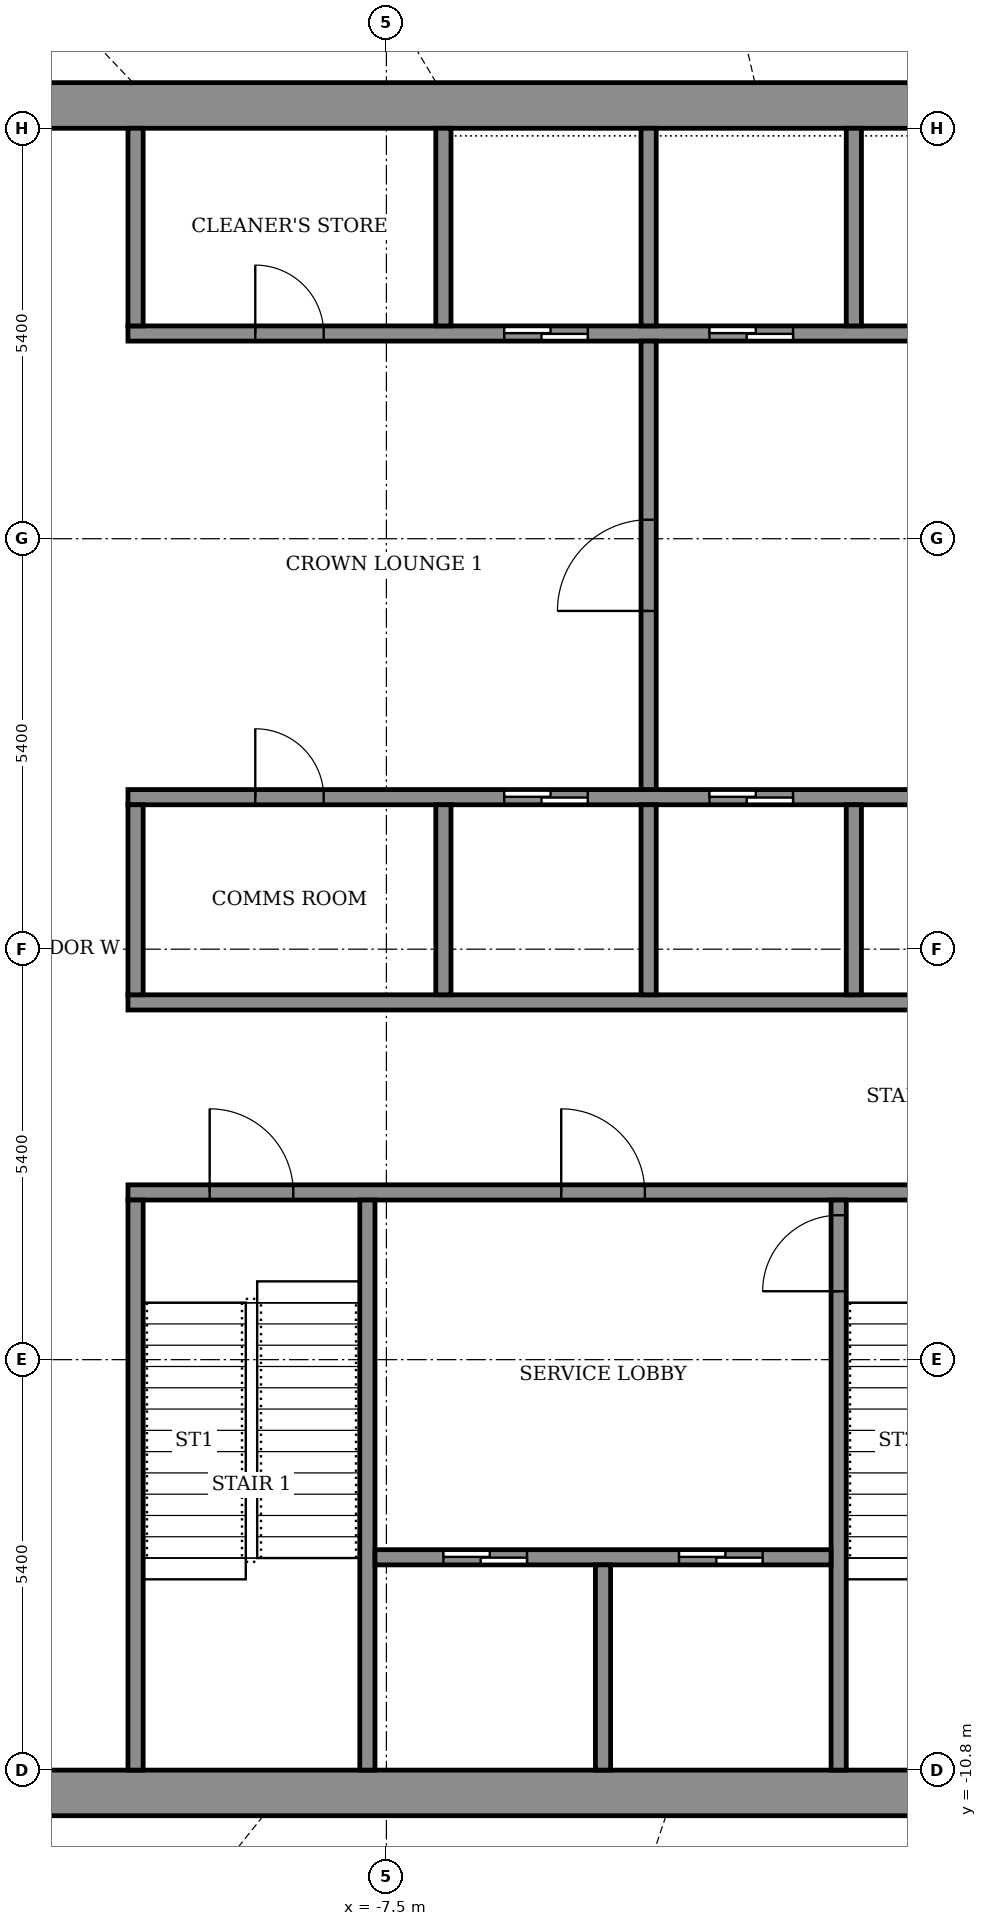
"""IFC4 building model, lengths in metres.
Left out: names, types, materials, properties, quantities, classifications, styles, units other than length and angle.
Written with IfcOpenShell. Run it as: python <this file> out.ifc"""

import sys

from ifc_helpers import new_model, si_unit, direction, frame, frame_2d, origin, place, context, subcontext, project, spatial, rectangle, extrude, element, fill, save


model = new_model("IFC4")
c1 = context("Model", 3, precision=1e-05, world=origin(), true_north=direction((0.0, 1.0)))
c2 = subcontext(c1, "Body", "Model", "MODEL_VIEW")
j1 = project(units=[si_unit("LENGTHUNIT", "METRE"), si_unit("PLANEANGLEUNIT", "RADIAN")], contexts=[c1])
p1 = place(None, origin())
s1 = spatial("IfcSite", under=j1, at=p1, CompositionType="ELEMENT")
p2 = place(p1, origin())
s2 = spatial("IfcBuilding", under=s1, at=p2, CompositionType="ELEMENT")
p3 = place(p2, frame((0.0, 0.0, 346.1)))
s3 = spatial("IfcBuildingStorey", under=s2, at=p3, CompositionType="ELEMENT", Elevation=346.1)
for number, where, z_axis, x_axis in (
    (1, (-14.4, -11.1, 0.0), (0.0, 0.0, 1.0), (1.0, 0.0, 0.0)),
    (2, (-14.4, 11.1, 0.0), (0.0, 0.0, 1.0), (1.0, 0.0, 0.0)),
):
    element("IfcWall", number, at=place(p3, frame(where, z_axis=z_axis, x_axis=x_axis)), inside=s3, PredefinedType="SHEAR", context=c2, shape_type="SweptSolid", body=[
        extrude(rectangle(XDim=28.8, YDim=0.6, at=frame_2d((14.4, 0.0))), origin(), (0.0, 0.0, 1.0), 4.6),
    ])
p4 = place(p3, frame((-10.9, -3.2, 0.0), z_axis=(0.0, 0.0, 1.0), x_axis=(1.0, 0.0, 0.0)))
e3 = element("IfcWall", 3, at=p4, inside=s3, PredefinedType="SHEAR", context=c2, shape_type="SweptSolid", body=[
    extrude(rectangle(XDim=21.8, YDim=0.2, at=frame_2d((10.9, 0.0))), origin(), (0.0, 0.0, 1.0), 4.05),
])
p5 = place(p4, frame((1.075, 0.0, 0.0)))
e4 = element("IfcOpeningElement", 4, at=p5, cuts=e3, PredefinedType="OPENING", context=c2, shape_type="SweptSolid", body=[
    extrude(rectangle(XDim=1.1, YDim=2.1, at=frame_2d((0.55, 1.05))), frame((0.0, 0.11, 0.0), z_axis=(0.0, -1.0, 0.0), x_axis=(1.0, 0.0, 0.0)), (0.0, 0.0, 1.0), 0.22),
])
p6 = place(p4, frame((10.325, 0.0, 0.0)))
e5 = element("IfcOpeningElement", 5, at=p6, cuts=e3, PredefinedType="OPENING", context=c2, shape_type="SweptSolid", body=[
    extrude(rectangle(XDim=1.1, YDim=2.1, at=frame_2d((0.55, 1.05))), frame((0.0, 0.11, 0.0), z_axis=(0.0, -1.0, 0.0), x_axis=(1.0, 0.0, 0.0)), (0.0, 0.0, 1.0), 0.22),
])
p7 = place(p4, frame((19.625, 0.0, 0.0)))
e6 = element("IfcOpeningElement", 6, at=p7, cuts=e3, PredefinedType="OPENING", context=c2, shape_type="SweptSolid", body=[
    extrude(rectangle(XDim=1.1, YDim=2.1, at=frame_2d((0.55, 1.05))), frame((0.0, 0.11, 0.0), z_axis=(0.0, -1.0, 0.0), x_axis=(1.0, 0.0, 0.0)), (0.0, 0.0, 1.0), 0.22),
])
p8 = place(p4, frame((5.7, 0.0, 0.0)))
e7 = element("IfcOpeningElement", 7, at=p8, cuts=e3, PredefinedType="OPENING", context=c2, shape_type="SweptSolid", body=[
    extrude(rectangle(XDim=1.1, YDim=2.1, at=frame_2d((0.55, 1.05))), frame((0.0, 0.11, 0.0), z_axis=(0.0, -1.0, 0.0), x_axis=(1.0, 0.0, 0.0)), (0.0, 0.0, 1.0), 0.22),
])
p9 = place(p4, frame((14.975, 0.0, 0.0)))
e8 = element("IfcOpeningElement", 8, at=p9, cuts=e3, PredefinedType="OPENING", context=c2, shape_type="SweptSolid", body=[
    extrude(rectangle(XDim=1.1, YDim=2.1, at=frame_2d((0.55, 1.05))), frame((0.0, 0.11, 0.0), z_axis=(0.0, -1.0, 0.0), x_axis=(1.0, 0.0, 0.0)), (0.0, 0.0, 1.0), 0.22),
])
p10 = place(p3, frame((-10.9, -0.7, 0.0), z_axis=(0.0, 0.0, 1.0), x_axis=(1.0, 0.0, 0.0)))
e9 = element("IfcWall", 9, at=p10, inside=s3, PredefinedType="SHEAR", context=c2, shape_type="SweptSolid", body=[
    extrude(rectangle(XDim=21.8, YDim=0.2, at=frame_2d((10.9, 0.0))), origin(), (0.0, 0.0, 1.0), 4.05),
])
p11 = place(p3, frame((-10.9, 2.0, 0.0), z_axis=(0.0, 0.0, 1.0), x_axis=(1.0, 0.0, 0.0)))
e10 = element("IfcWall", 10, at=p11, inside=s3, PredefinedType="SHEAR", context=c2, shape_type="SweptSolid", body=[
    extrude(rectangle(XDim=21.8, YDim=0.2, at=frame_2d((10.9, 0.0))), origin(), (0.0, 0.0, 1.0), 4.05),
])
p12 = place(p11, frame((4.95, 0.0, 0.0)))
e11 = element("IfcOpeningElement", 11, at=p12, cuts=e10, PredefinedType="OPENING", context=c2, shape_type="SweptSolid", body=[
    extrude(rectangle(XDim=1.1, YDim=2.1, at=frame_2d((0.55, 1.05))), frame((0.0, 0.11, 0.0), z_axis=(0.0, -1.0, 0.0), x_axis=(1.0, 0.0, 0.0)), (0.0, 0.0, 1.0), 0.22),
])
p13 = place(p11, frame((7.65, 0.0, 0.0)))
e12 = element("IfcOpeningElement", 12, at=p13, cuts=e10, PredefinedType="OPENING", context=c2, shape_type="SweptSolid", body=[
    extrude(rectangle(XDim=1.1, YDim=2.1, at=frame_2d((0.55, 1.05))), frame((0.0, 0.11, 0.0), z_axis=(0.0, -1.0, 0.0), x_axis=(1.0, 0.0, 0.0)), (0.0, 0.0, 1.0), 0.22),
])
p14 = place(p11, frame((10.35, 0.0, 0.0)))
e13 = element("IfcOpeningElement", 13, at=p14, cuts=e10, PredefinedType="OPENING", context=c2, shape_type="SweptSolid", body=[
    extrude(rectangle(XDim=1.1, YDim=2.1, at=frame_2d((0.55, 1.05))), frame((0.0, 0.11, 0.0), z_axis=(0.0, -1.0, 0.0), x_axis=(1.0, 0.0, 0.0)), (0.0, 0.0, 1.0), 0.22),
])
p15 = place(p11, frame((1.675, 0.0, 0.0)))
e14 = element("IfcOpeningElement", 14, at=p15, cuts=e10, PredefinedType="OPENING", context=c2, shape_type="SweptSolid", body=[
    extrude(rectangle(XDim=0.9, YDim=2.1, at=frame_2d((0.45, 1.05))), frame((0.0, 0.11, 0.0), z_axis=(0.0, -1.0, 0.0), x_axis=(1.0, 0.0, 0.0)), (0.0, 0.0, 1.0), 0.22),
])
p16 = place(p11, frame((13.825, 0.0, 0.0)))
e15 = element("IfcOpeningElement", 15, at=p16, cuts=e10, PredefinedType="OPENING", context=c2, shape_type="SweptSolid", body=[
    extrude(rectangle(XDim=0.9, YDim=2.1, at=frame_2d((0.45, 1.05))), frame((0.0, 0.11, 0.0), z_axis=(0.0, -1.0, 0.0), x_axis=(1.0, 0.0, 0.0)), (0.0, 0.0, 1.0), 0.22),
])
p17 = place(p11, frame((18.55, 0.0, 0.0)))
e16 = element("IfcOpeningElement", 16, at=p17, cuts=e10, PredefinedType="OPENING", context=c2, shape_type="SweptSolid", body=[
    extrude(rectangle(XDim=0.9, YDim=2.1, at=frame_2d((0.45, 1.05))), frame((0.0, 0.11, 0.0), z_axis=(0.0, -1.0, 0.0), x_axis=(1.0, 0.0, 0.0)), (0.0, 0.0, 1.0), 0.22),
])
p18 = place(p3, frame((-10.9, 8.1, 0.0), z_axis=(0.0, 0.0, 1.0), x_axis=(1.0, 0.0, 0.0)))
e17 = element("IfcWall", 17, at=p18, inside=s3, PredefinedType="SHEAR", context=c2, shape_type="SweptSolid", body=[
    extrude(rectangle(XDim=21.8, YDim=0.2, at=frame_2d((10.9, 0.0))), origin(), (0.0, 0.0, 1.0), 4.05),
])
p19 = place(p18, frame((4.95, 0.0, 0.0)))
e18 = element("IfcOpeningElement", 18, at=p19, cuts=e17, PredefinedType="OPENING", context=c2, shape_type="SweptSolid", body=[
    extrude(rectangle(XDim=1.1, YDim=2.1, at=frame_2d((0.55, 1.05))), frame((0.0, 0.11, 0.0), z_axis=(0.0, -1.0, 0.0), x_axis=(1.0, 0.0, 0.0)), (0.0, 0.0, 1.0), 0.22),
])
p20 = place(p18, frame((7.65, 0.0, 0.0)))
e19 = element("IfcOpeningElement", 19, at=p20, cuts=e17, PredefinedType="OPENING", context=c2, shape_type="SweptSolid", body=[
    extrude(rectangle(XDim=1.1, YDim=2.1, at=frame_2d((0.55, 1.05))), frame((0.0, 0.11, 0.0), z_axis=(0.0, -1.0, 0.0), x_axis=(1.0, 0.0, 0.0)), (0.0, 0.0, 1.0), 0.22),
])
p21 = place(p18, frame((10.35, 0.0, 0.0)))
e20 = element("IfcOpeningElement", 20, at=p21, cuts=e17, PredefinedType="OPENING", context=c2, shape_type="SweptSolid", body=[
    extrude(rectangle(XDim=1.1, YDim=2.1, at=frame_2d((0.55, 1.05))), frame((0.0, 0.11, 0.0), z_axis=(0.0, -1.0, 0.0), x_axis=(1.0, 0.0, 0.0)), (0.0, 0.0, 1.0), 0.22),
])
p22 = place(p18, frame((1.675, 0.0, 0.0)))
e21 = element("IfcOpeningElement", 21, at=p22, cuts=e17, PredefinedType="OPENING", context=c2, shape_type="SweptSolid", body=[
    extrude(rectangle(XDim=0.9, YDim=2.1, at=frame_2d((0.45, 1.05))), frame((0.0, 0.11, 0.0), z_axis=(0.0, -1.0, 0.0), x_axis=(1.0, 0.0, 0.0)), (0.0, 0.0, 1.0), 0.22),
])
p23 = place(p18, frame((13.825, 0.0, 0.0)))
e22 = element("IfcOpeningElement", 22, at=p23, cuts=e17, PredefinedType="OPENING", context=c2, shape_type="SweptSolid", body=[
    extrude(rectangle(XDim=0.9, YDim=2.1, at=frame_2d((0.45, 1.05))), frame((0.0, 0.11, 0.0), z_axis=(0.0, -1.0, 0.0), x_axis=(1.0, 0.0, 0.0)), (0.0, 0.0, 1.0), 0.22),
])
p24 = place(p18, frame((18.55, 0.0, 0.0)))
e23 = element("IfcOpeningElement", 23, at=p24, cuts=e17, PredefinedType="OPENING", context=c2, shape_type="SweptSolid", body=[
    extrude(rectangle(XDim=0.9, YDim=2.1, at=frame_2d((0.45, 1.05))), frame((0.0, 0.11, 0.0), z_axis=(0.0, -1.0, 0.0), x_axis=(1.0, 0.0, 0.0)), (0.0, 0.0, 1.0), 0.22),
])
for number, where, z_axis, x_axis in (
    (24, (-10.8, -10.8, 0.0), (0.0, 0.0, 1.0), (0.0, 1.0, 0.0)),
    (25, (-7.75, -10.8, 0.0), (0.0, 0.0, 1.0), (0.0, 1.0, 0.0)),
):
    element("IfcWall", number, at=place(p3, frame(where, z_axis=z_axis, x_axis=x_axis)), inside=s3, PredefinedType="SHEAR", context=c2, shape_type="SweptSolid", body=[
        extrude(rectangle(XDim=7.5, YDim=0.2, at=frame_2d((3.75, 0.0))), origin(), (0.0, 0.0, 1.0), 4.05),
    ])
p25 = place(p3, frame((-1.55, -10.8, 0.0), z_axis=(0.0, 0.0, 1.0), x_axis=(0.0, 1.0, 0.0)))
e26 = element("IfcWall", 26, at=p25, inside=s3, PredefinedType="SHEAR", context=c2, shape_type="SweptSolid", body=[
    extrude(rectangle(XDim=7.5, YDim=0.2, at=frame_2d((3.75, 0.0))), origin(), (0.0, 0.0, 1.0), 4.05),
])
p26 = place(p25, frame((6.3, 0.0, 0.0)))
e27 = element("IfcOpeningElement", 27, at=p26, cuts=e26, PredefinedType="OPENING", context=c2, shape_type="SweptSolid", body=[
    extrude(rectangle(XDim=1.0, YDim=2.1, at=frame_2d((0.5, 1.05))), frame((0.0, 0.11, 0.0), z_axis=(0.0, -1.0, 0.0), x_axis=(1.0, 0.0, 0.0)), (0.0, 0.0, 1.0), 0.22),
])
p27 = place(p3, frame((-7.65, -8.0, 0.0), z_axis=(0.0, 0.0, 1.0), x_axis=(1.0, 0.0, 0.0)))
e28 = element("IfcWall", 28, at=p27, inside=s3, PredefinedType="SHEAR", context=c2, shape_type="SweptSolid", body=[
    extrude(rectangle(XDim=6.0, YDim=0.2, at=frame_2d((3.0, 0.0))), origin(), (0.0, 0.0, 1.0), 4.05),
])
p28 = place(p27, frame((0.9, 0.0, 0.0)))
e29 = element("IfcOpeningElement", 29, at=p28, cuts=e28, PredefinedType="OPENING", context=c2, shape_type="SweptSolid", body=[
    extrude(rectangle(XDim=1.1, YDim=2.1, at=frame_2d((0.55, 1.05))), frame((0.0, 0.11, 0.0), z_axis=(0.0, -1.0, 0.0), x_axis=(1.0, 0.0, 0.0)), (0.0, 0.0, 1.0), 0.22),
])
p29 = place(p27, frame((4.0, 0.0, 0.0)))
e30 = element("IfcOpeningElement", 30, at=p29, cuts=e28, PredefinedType="OPENING", context=c2, shape_type="SweptSolid", body=[
    extrude(rectangle(XDim=1.1, YDim=2.1, at=frame_2d((0.55, 1.05))), frame((0.0, 0.11, 0.0), z_axis=(0.0, -1.0, 0.0), x_axis=(1.0, 0.0, 0.0)), (0.0, 0.0, 1.0), 0.22),
])
p30 = place(p3, frame((-4.65, -10.8, 0.0), z_axis=(0.0, 0.0, 1.0), x_axis=(0.0, 1.0, 0.0)))
e31 = element("IfcWall", 31, at=p30, inside=s3, PredefinedType="SHEAR", context=c2, shape_type="SweptSolid", body=[
    extrude(rectangle(XDim=2.7, YDim=0.2, at=frame_2d((1.35, 0.0))), origin(), (0.0, 0.0, 1.0), 4.05),
])
p31 = place(p3, frame((-10.8, -0.6, 0.0), z_axis=(0.0, 0.0, 1.0), x_axis=(0.0, 1.0, 0.0)))
e32 = element("IfcWall", 32, at=p31, inside=s3, PredefinedType="STANDARD", context=c2, shape_type="SweptSolid", body=[
    extrude(rectangle(XDim=2.5, YDim=0.2, at=frame_2d((1.25, 0.0))), origin(), (0.0, 0.0, 1.0), 4.05),
])
for number, where, z_axis, x_axis in (
    (33, (-6.75, -0.6, 0.0), (0.0, 0.0, 1.0), (0.0, 1.0, 0.0)),
    (34, (-4.05, -0.6, 0.0), (0.0, 0.0, 1.0), (0.0, 1.0, 0.0)),
    (35, (-1.35, -0.6, 0.0), (0.0, 0.0, 1.0), (0.0, 1.0, 0.0)),
):
    element("IfcWall", number, at=place(p3, frame(where, z_axis=z_axis, x_axis=x_axis)), inside=s3, PredefinedType="SHEAR", context=c2, shape_type="SweptSolid", body=[
        extrude(rectangle(XDim=2.5, YDim=0.2, at=frame_2d((1.25, 0.0))), origin(), (0.0, 0.0, 1.0), 4.05),
    ])
p32 = place(p3, frame((-10.8, 8.2, 0.0), z_axis=(0.0, 0.0, 1.0), x_axis=(0.0, 1.0, 0.0)))
e36 = element("IfcWall", 36, at=p32, inside=s3, PredefinedType="STANDARD", context=c2, shape_type="SweptSolid", body=[
    extrude(rectangle(XDim=2.6, YDim=0.2, at=frame_2d((1.3, 0.0))), origin(), (0.0, 0.0, 1.0), 4.05),
])
for number, where, z_axis, x_axis in (
    (37, (-6.75, 8.2, 0.0), (0.0, 0.0, 1.0), (0.0, 1.0, 0.0)),
    (38, (-4.05, 8.2, 0.0), (0.0, 0.0, 1.0), (0.0, 1.0, 0.0)),
    (39, (-1.35, 8.2, 0.0), (0.0, 0.0, 1.0), (0.0, 1.0, 0.0)),
):
    element("IfcWall", number, at=place(p3, frame(where, z_axis=z_axis, x_axis=x_axis)), inside=s3, PredefinedType="SHEAR", context=c2, shape_type="SweptSolid", body=[
        extrude(rectangle(XDim=2.6, YDim=0.2, at=frame_2d((1.3, 0.0))), origin(), (0.0, 0.0, 1.0), 4.05),
    ])
p33 = place(p3, frame((-4.05, 2.1, 0.0), z_axis=(0.0, 0.0, 1.0), x_axis=(0.0, 1.0, 0.0)))
e40 = element("IfcWall", 40, at=p33, inside=s3, PredefinedType="STANDARD", context=c2, shape_type="SweptSolid", body=[
    extrude(rectangle(XDim=5.9, YDim=0.2, at=frame_2d((2.95, 0.0))), origin(), (0.0, 0.0, 1.0), 4.05),
])
p34 = place(p33, frame((2.35, 0.0, 0.0)))
e41 = element("IfcOpeningElement", 41, at=p34, cuts=e40, PredefinedType="OPENING", context=c2, shape_type="SweptSolid", body=[
    extrude(rectangle(XDim=1.2, YDim=2.1, at=frame_2d((0.6, 1.05))), frame((0.0, 0.11, 0.0), z_axis=(0.0, -1.0, 0.0), x_axis=(1.0, 0.0, 0.0)), (0.0, 0.0, 1.0), 0.22),
])
p35 = place(p12, origin())
e42 = element("IfcDoor", 42, at=p35, inside=s3, OperationType="SLIDING_TO_LEFT", PredefinedType="DOOR", context=c2, shape_type="SweptSolid", body=[
    extrude(rectangle(XDim=1.1, YDim=2.1, at=frame_2d((0.55, 1.05))), frame((0.0, 0.025, 0.0), z_axis=(0.0, -1.0, 0.0), x_axis=(1.0, 0.0, 0.0)), (0.0, 0.0, 1.0), 0.05),
])
fill(e11, e42)
p36 = place(p13, origin())
e43 = element("IfcDoor", 43, at=p36, inside=s3, OperationType="SLIDING_TO_LEFT", PredefinedType="DOOR", context=c2, shape_type="SweptSolid", body=[
    extrude(rectangle(XDim=1.1, YDim=2.1, at=frame_2d((0.55, 1.05))), frame((0.0, 0.025, 0.0), z_axis=(0.0, -1.0, 0.0), x_axis=(1.0, 0.0, 0.0)), (0.0, 0.0, 1.0), 0.05),
])
fill(e12, e43)
p37 = place(p19, origin())
e44 = element("IfcDoor", 44, at=p37, inside=s3, OperationType="SLIDING_TO_LEFT", PredefinedType="DOOR", context=c2, shape_type="SweptSolid", body=[
    extrude(rectangle(XDim=1.1, YDim=2.1, at=frame_2d((0.55, 1.05))), frame((0.0, 0.025, 0.0), z_axis=(0.0, -1.0, 0.0), x_axis=(1.0, 0.0, 0.0)), (0.0, 0.0, 1.0), 0.05),
])
fill(e18, e44)
p38 = place(p20, origin())
e45 = element("IfcDoor", 45, at=p38, inside=s3, OperationType="SLIDING_TO_LEFT", PredefinedType="DOOR", context=c2, shape_type="SweptSolid", body=[
    extrude(rectangle(XDim=1.1, YDim=2.1, at=frame_2d((0.55, 1.05))), frame((0.0, 0.025, 0.0), z_axis=(0.0, -1.0, 0.0), x_axis=(1.0, 0.0, 0.0)), (0.0, 0.0, 1.0), 0.05),
])
fill(e19, e45)
p39 = place(p15, origin())
e46 = element("IfcDoor", 46, at=p39, inside=s3, OperationType="SINGLE_SWING_LEFT", PredefinedType="DOOR", context=c2, shape_type="SweptSolid", body=[
    extrude(rectangle(XDim=0.9, YDim=2.1, at=frame_2d((0.45, 1.05))), frame((0.0, 0.025, 0.0), z_axis=(0.0, -1.0, 0.0), x_axis=(1.0, 0.0, 0.0)), (0.0, 0.0, 1.0), 0.05),
])
fill(e14, e46)
p40 = place(p22, origin())
e47 = element("IfcDoor", 47, at=p40, inside=s3, OperationType="SINGLE_SWING_RIGHT", PredefinedType="DOOR", context=c2, shape_type="SweptSolid", body=[
    extrude(rectangle(XDim=0.9, YDim=2.1, at=frame_2d((0.45, 1.05))), frame((0.0, 0.025, 0.0), z_axis=(0.0, -1.0, 0.0), x_axis=(1.0, 0.0, 0.0)), (0.0, 0.0, 1.0), 0.05),
])
fill(e21, e47)
p41 = place(p28, origin())
e48 = element("IfcDoor", 48, at=p41, inside=s3, OperationType="SLIDING_TO_LEFT", PredefinedType="DOOR", context=c2, shape_type="SweptSolid", body=[
    extrude(rectangle(XDim=1.1, YDim=2.1, at=frame_2d((0.55, 1.05))), frame((0.0, 0.025, 0.0), z_axis=(0.0, -1.0, 0.0), x_axis=(1.0, 0.0, 0.0)), (0.0, 0.0, 1.0), 0.05),
])
fill(e29, e48)
p42 = place(p29, origin())
e49 = element("IfcDoor", 49, at=p42, inside=s3, OperationType="SLIDING_TO_LEFT", PredefinedType="DOOR", context=c2, shape_type="SweptSolid", body=[
    extrude(rectangle(XDim=1.1, YDim=2.1, at=frame_2d((0.55, 1.05))), frame((0.0, 0.025, 0.0), z_axis=(0.0, -1.0, 0.0), x_axis=(1.0, 0.0, 0.0)), (0.0, 0.0, 1.0), 0.05),
])
fill(e30, e49)
p43 = place(p5, origin())
e50 = element("IfcDoor", 50, at=p43, inside=s3, OperationType="SINGLE_SWING_RIGHT", PredefinedType="DOOR", context=c2, shape_type="SweptSolid", body=[
    extrude(rectangle(XDim=1.1, YDim=2.1, at=frame_2d((0.55, 1.05))), frame((0.0, 0.025, 0.0), z_axis=(0.0, -1.0, 0.0), x_axis=(1.0, 0.0, 0.0)), (0.0, 0.0, 1.0), 0.05),
])
fill(e4, e50)
p44 = place(p8, origin())
e51 = element("IfcDoor", 51, at=p44, inside=s3, OperationType="SINGLE_SWING_LEFT", PredefinedType="DOOR", context=c2, shape_type="SweptSolid", body=[
    extrude(rectangle(XDim=1.1, YDim=2.1, at=frame_2d((0.55, 1.05))), frame((0.0, 0.025, 0.0), z_axis=(0.0, -1.0, 0.0), x_axis=(1.0, 0.0, 0.0)), (0.0, 0.0, 1.0), 0.05),
])
fill(e7, e51)
p45 = place(p26, origin())
e52 = element("IfcDoor", 52, at=p45, inside=s3, OperationType="SINGLE_SWING_RIGHT", PredefinedType="DOOR", context=c2, shape_type="SweptSolid", body=[
    extrude(rectangle(XDim=1.0, YDim=2.1, at=frame_2d((0.5, 1.05))), frame((0.0, 0.025, 0.0), z_axis=(0.0, -1.0, 0.0), x_axis=(1.0, 0.0, 0.0)), (0.0, 0.0, 1.0), 0.05),
])
fill(e27, e52)
p46 = place(p34, origin())
e53 = element("IfcDoor", 53, at=p46, inside=s3, OperationType="SINGLE_SWING_LEFT", PredefinedType="DOOR", context=c2, shape_type="SweptSolid", body=[
    extrude(rectangle(XDim=1.2, YDim=2.1, at=frame_2d((0.6, 1.05))), frame((0.0, 0.025, 0.0), z_axis=(0.0, -1.0, 0.0), x_axis=(1.0, 0.0, 0.0)), (0.0, 0.0, 1.0), 0.05),
])
fill(e41, e53)
save(model, sys.argv[1])
